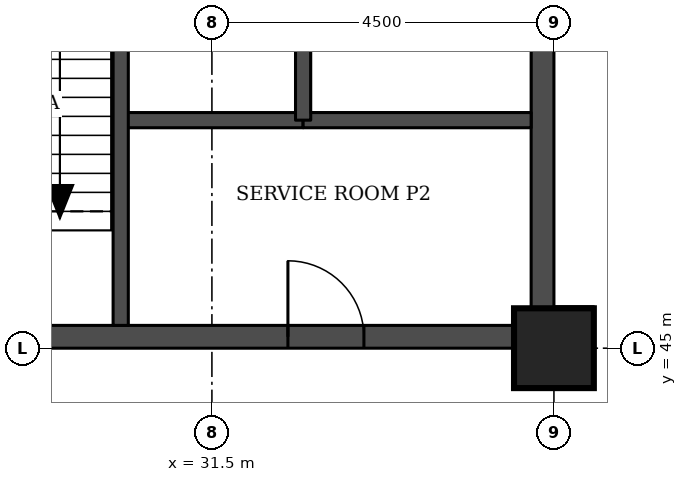
"""IFC4 building model, lengths in metres.
Left out: names, types, materials, properties, quantities, classifications, styles, units other than length and angle.
Written with IfcOpenShell. Run it as: python <this file> out.ifc"""

import sys

from ifc_helpers import new_model, si_unit, direction, frame, frame_2d, origin, origin_2d, place, context, subcontext, project, spatial, rectangle, extrude, element, fill, save


model = new_model("IFC4")
c1 = context("Model", 3, precision=1e-05, world=origin(), true_north=direction((0.0, 1.0)))
c2 = subcontext(c1, "Body", "Model", "MODEL_VIEW")
j1 = project(units=[si_unit("LENGTHUNIT", "METRE"), si_unit("PLANEANGLEUNIT", "RADIAN")], contexts=[c1])
p1 = place(None, origin())
s1 = spatial("IfcSite", under=j1, at=p1, CompositionType="ELEMENT")
p2 = place(p1, origin())
s2 = spatial("IfcBuilding", under=s1, at=p2, CompositionType="ELEMENT")
p3 = place(p2, frame((0.0, 0.0, 134.4)))
s3 = spatial("IfcBuildingStorey", under=s2, at=p3, CompositionType="ELEMENT", Elevation=134.4)
p4 = place(p3, frame((36.0, 45.0, 0.0), z_axis=(0.0, 0.0, 1.0), x_axis=(1.0, 0.0, 0.0)))
e1 = element("IfcColumn", 1, at=p4, inside=s3, PredefinedType="COLUMN", context=c2, shape_type="SweptSolid", body=[
    extrude(rectangle(XDim=1.05, YDim=1.05, at=origin_2d()), origin(), (0.0, 0.0, 1.0), 3.7),
])
p5 = place(p3, frame((27.3, 45.15, 0.0), z_axis=(0.0, 0.0, 1.0), x_axis=(1.0, 0.0, 0.0)))
e2 = element("IfcWall", 2, at=p5, inside=s3, PredefinedType="SHEAR", context=c2, shape_type="SweptSolid", body=[
    extrude(rectangle(XDim=8.4, YDim=0.3, at=frame_2d((4.2, 0.0))), origin(), (0.0, 0.0, 1.0), 3.7),
])
p6 = place(p5, frame((5.2, 0.0, 0.0)))
e3 = element("IfcOpeningElement", 3, at=p6, cuts=e2, PredefinedType="OPENING", context=c2, shape_type="SweptSolid", body=[
    extrude(rectangle(XDim=1.0, YDim=2.1, at=frame_2d((0.5, 1.05))), frame((0.0, 0.16, 0.0), z_axis=(0.0, -1.0, 0.0), x_axis=(1.0, 0.0, 0.0)), (0.0, 0.0, 1.0), 0.32),
])
p7 = place(p3, frame((35.85, 45.0, 0.0), z_axis=(0.0, 0.0, 1.0), x_axis=(0.0, 1.0, 0.0)))
e4 = element("IfcWall", 4, at=p7, inside=s3, PredefinedType="SHEAR", context=c2, shape_type="SweptSolid", body=[
    extrude(rectangle(XDim=9.0, YDim=0.3, at=frame_2d((4.5, 0.0))), origin(), (0.0, 0.0, 1.0), 3.7),
])
p8 = place(p3, frame((30.3, 48.0, 0.0), z_axis=(0.0, 0.0, 1.0), x_axis=(1.0, 0.0, 0.0)))
e5 = element("IfcWall", 5, at=p8, inside=s3, PredefinedType="SOLIDWALL", context=c2, shape_type="SweptSolid", body=[
    extrude(rectangle(XDim=2.4, YDim=0.2, at=frame_2d((1.2, 0.0))), origin(), (0.0, 0.0, 1.0), 3.55),
])
p9 = place(p3, frame((32.7, 48.0, 0.0), z_axis=(0.0, 0.0, 1.0), x_axis=(1.0, 0.0, 0.0)))
e6 = element("IfcWall", 6, at=p9, inside=s3, PredefinedType="SOLIDWALL", context=c2, shape_type="SweptSolid", body=[
    extrude(rectangle(XDim=3.0, YDim=0.2, at=frame_2d((1.5, 0.0))), origin(), (0.0, 0.0, 1.0), 3.55),
])
for number, where, z_axis, x_axis in (
    (7, (30.3, 45.3, 0.0), (0.0, 0.0, 1.0), (0.0, 1.0, 0.0)),
    (8, (32.7, 48.0, 0.0), (0.0, 0.0, 1.0), (0.0, 1.0, 0.0)),
):
    element("IfcWall", number, at=place(p3, frame(where, z_axis=z_axis, x_axis=x_axis)), inside=s3, PredefinedType="SOLIDWALL", context=c2, shape_type="SweptSolid", body=[
        extrude(rectangle(XDim=5.7, YDim=0.2, at=frame_2d((2.85, 0.0))), origin(), (0.0, 0.0, 1.0), 3.55),
    ])
p10 = place(p6, origin())
e9 = element("IfcDoor", 9, at=p10, inside=s3, OperationType="SINGLE_SWING_LEFT", PredefinedType="DOOR", context=c2, shape_type="SweptSolid", body=[
    extrude(rectangle(XDim=1.0, YDim=2.1, at=frame_2d((0.5, 1.05))), frame((0.0, 0.025, 0.0), z_axis=(0.0, -1.0, 0.0), x_axis=(1.0, 0.0, 0.0)), (0.0, 0.0, 1.0), 0.05),
])
fill(e3, e9)
save(model, sys.argv[1])
